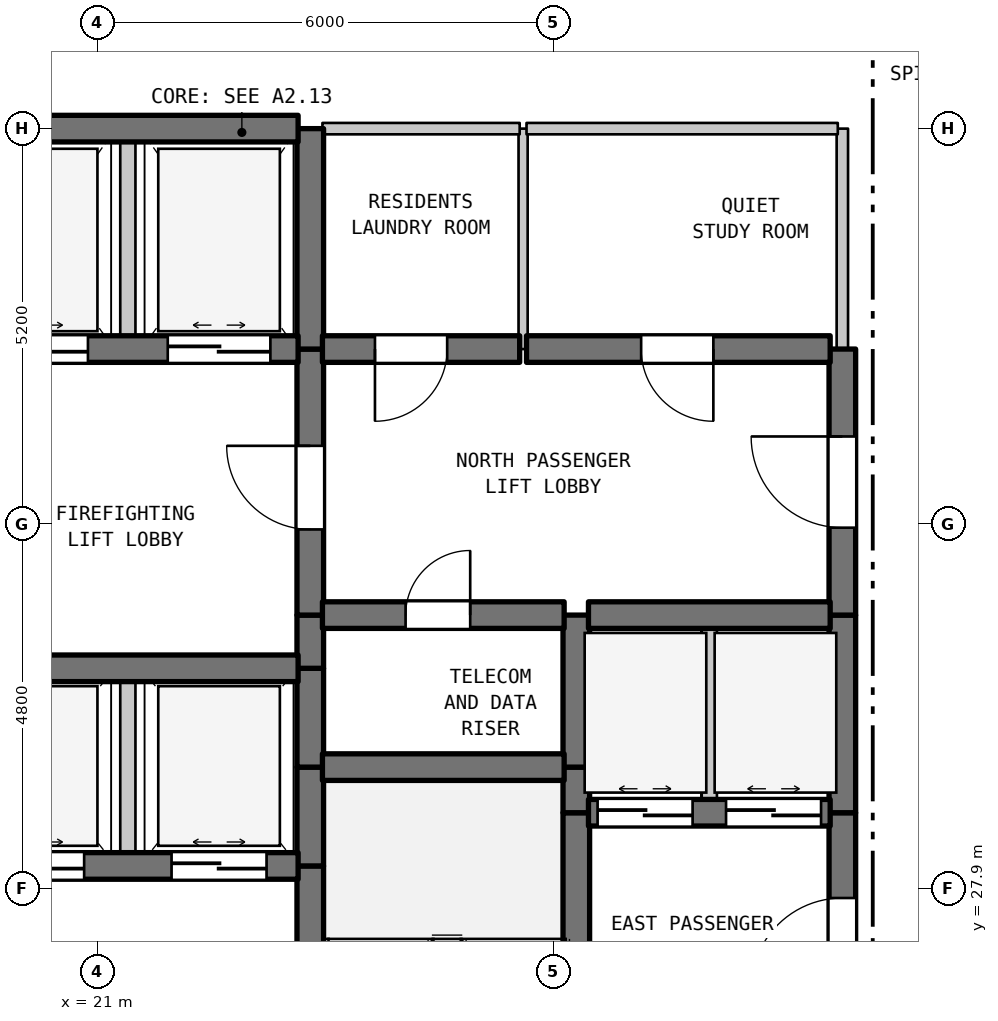
"""IFC4 building model, lengths in metres.
Left out: names, types, materials, properties, quantities, classifications, styles, units other than length and angle.
Written with IfcOpenShell. Run it as: python <this file> out.ifc"""

import sys

from ifc_helpers import new_model, si_unit, direction, frame, frame_2d, origin, place, context, subcontext, project, spatial, rectangle, extrude, element, fill, save


model = new_model("IFC4")
c1 = context("Model", 3, precision=1e-05, world=origin(), true_north=direction((0.0, 1.0)))
c2 = subcontext(c1, "Body", "Model", "MODEL_VIEW")
j1 = project(units=[si_unit("LENGTHUNIT", "METRE"), si_unit("PLANEANGLEUNIT", "RADIAN")], contexts=[c1])
p1 = place(None, origin())
s1 = spatial("IfcSite", under=j1, at=p1, CompositionType="ELEMENT")
p2 = place(p1, origin())
s2 = spatial("IfcBuilding", under=s1, at=p2, CompositionType="ELEMENT")
p3 = place(p2, frame((0.0, 0.0, 152.0)))
s3 = spatial("IfcBuildingStorey", under=s2, at=p3, CompositionType="ELEMENT", Elevation=152.0)
p4 = place(p3, frame((21.4, 28.2, 0.0), z_axis=(0.0, 0.0, 1.0), x_axis=(0.0, 1.0, 0.0)))
e1 = element("IfcWall", 1, at=p4, inside=s3, PredefinedType="STANDARD", context=c2, shape_type="SweptSolid", body=[
    extrude(rectangle(XDim=2.6, YDim=0.2, at=frame_2d((1.3, 0.0))), origin(), (0.0, 0.0, 1.0), 3.385),
])
p5 = place(p3, frame((21.4, 35.0, 0.0), z_axis=(0.0, 0.0, 1.0), x_axis=(0.0, 1.0, 0.0)))
e2 = element("IfcWall", 2, at=p5, inside=s3, PredefinedType="STANDARD", context=c2, shape_type="SweptSolid", body=[
    extrude(rectangle(XDim=2.9, YDim=0.2, at=frame_2d((1.45, 0.0))), origin(), (0.0, 0.0, 1.0), 3.385),
])
p6 = place(p3, frame((23.8, 22.7, 0.0), z_axis=(0.0, 0.0, 1.0), x_axis=(0.0, 1.0, 0.0)))
e3 = element("IfcWall", 3, at=p6, inside=s3, PredefinedType="SHEAR", context=c2, shape_type="SweptSolid", body=[
    extrude(rectangle(XDim=5.5, YDim=0.35, at=frame_2d((2.75, 0.0))), origin(), (0.0, 0.0, 1.0), 3.385),
])
p7 = place(p6, frame((0.235, 0.0, 0.0)))
e4 = element("IfcOpeningElement", 4, at=p7, cuts=e3, PredefinedType="OPENING", context=c2, shape_type="SweptSolid", body=[
    extrude(rectangle(XDim=1.1, YDim=2.15, at=frame_2d((0.55, 1.075))), frame((0.0, 0.185, 0.0), z_axis=(0.0, -1.0, 0.0), x_axis=(1.0, 0.0, 0.0)), (0.0, 0.0, 1.0), 0.37),
])
for number, where, z_axis, x_axis in (
    (5, (23.8, 28.2, 0.0), (0.0, 0.0, 1.0), (0.0, 1.0, 0.0)),
    (6, (23.8, 29.5, 0.0), (0.0, 0.0, 1.0), (0.0, 1.0, 0.0)),
):
    element("IfcWall", number, at=place(p3, frame(where, z_axis=z_axis, x_axis=x_axis)), inside=s3, PredefinedType="SHEAR", context=c2, shape_type="SweptSolid", body=[
        extrude(rectangle(XDim=1.3, YDim=0.35, at=frame_2d((0.65, 0.0))), origin(), (0.0, 0.0, 1.0), 3.385),
    ])
p8 = place(p3, frame((23.8, 30.8, 0.0), z_axis=(0.0, 0.0, 1.0), x_axis=(0.0, 1.0, 0.0)))
e7 = element("IfcWall", 7, at=p8, inside=s3, PredefinedType="SHEAR", context=c2, shape_type="SweptSolid", body=[
    extrude(rectangle(XDim=0.7, YDim=0.35, at=frame_2d((0.35, 0.0))), origin(), (0.0, 0.0, 1.0), 3.385),
])
p9 = place(p3, frame((23.8, 31.5, 0.0), z_axis=(0.0, 0.0, 1.0), x_axis=(0.0, 1.0, 0.0)))
e8 = element("IfcWall", 8, at=p9, inside=s3, PredefinedType="SHEAR", context=c2, shape_type="SweptSolid", body=[
    extrude(rectangle(XDim=3.5, YDim=0.35, at=frame_2d((1.75, 0.0))), origin(), (0.0, 0.0, 1.0), 3.385),
])
p10 = place(p9, frame((1.127, 0.0, 0.0)))
e9 = element("IfcOpeningElement", 9, at=p10, cuts=e8, PredefinedType="OPENING", context=c2, shape_type="SweptSolid", body=[
    extrude(rectangle(XDim=1.1, YDim=2.15, at=frame_2d((0.55, 1.075))), frame((0.0, 0.185, 0.0), z_axis=(0.0, -1.0, 0.0), x_axis=(1.0, 0.0, 0.0)), (0.0, 0.0, 1.0), 0.37),
])
p11 = place(p3, frame((23.8, 35.0, 0.0), z_axis=(0.0, 0.0, 1.0), x_axis=(0.0, 1.0, 0.0)))
e10 = element("IfcWall", 10, at=p11, inside=s3, PredefinedType="SHEAR", context=c2, shape_type="SweptSolid", body=[
    extrude(rectangle(XDim=2.9, YDim=0.35, at=frame_2d((1.45, 0.0))), origin(), (0.0, 0.0, 1.0), 3.385),
])
p12 = place(p3, frame((26.6, 35.0, 0.0), z_axis=(0.0, 0.0, 1.0), x_axis=(0.0, 1.0, 0.0)))
e11 = element("IfcWall", 11, at=p12, inside=s3, PredefinedType="PARTITIONING", context=c2, shape_type="SweptSolid", body=[
    extrude(rectangle(XDim=2.9, YDim=0.12, at=frame_2d((1.45, 0.0))), origin(), (0.0, 0.0, 1.0), 3.385),
])
p13 = place(p3, frame((27.3, 25.6, 0.0), z_axis=(0.0, 0.0, 1.0), x_axis=(0.0, 1.0, 0.0)))
e12 = element("IfcWall", 12, at=p13, inside=s3, PredefinedType="SHEAR", context=c2, shape_type="SweptSolid", body=[
    extrude(rectangle(XDim=3.3, YDim=0.35, at=frame_2d((1.65, 0.0))), origin(), (0.0, 0.0, 1.0), 3.385),
])
p14 = place(p3, frame((27.3, 28.9, 0.0), z_axis=(0.0, 0.0, 1.0), x_axis=(0.0, 1.0, 0.0)))
e13 = element("IfcWall", 13, at=p14, inside=s3, PredefinedType="SHEAR", context=c2, shape_type="SweptSolid", body=[
    extrude(rectangle(XDim=0.6, YDim=0.35, at=frame_2d((0.3, 0.0))), origin(), (0.0, 0.0, 1.0), 3.385),
])
p15 = place(p3, frame((27.3, 29.5, 0.0), z_axis=(0.0, 0.0, 1.0), x_axis=(0.0, 1.0, 0.0)))
e14 = element("IfcWall", 14, at=p15, inside=s3, PredefinedType="SHEAR", context=c2, shape_type="SweptSolid", body=[
    extrude(rectangle(XDim=2.0, YDim=0.35, at=frame_2d((1.0, 0.0))), origin(), (0.0, 0.0, 1.0), 3.385),
])
p16 = place(p3, frame((29.05, 28.9, 0.0), z_axis=(0.0, 0.0, 1.0), x_axis=(0.0, 1.0, 0.0)))
e15 = element("IfcWall", 15, at=p16, inside=s3, PredefinedType="STANDARD", context=c2, shape_type="SweptSolid", body=[
    extrude(rectangle(XDim=2.6, YDim=0.2, at=frame_2d((1.3, 0.0))), origin(), (0.0, 0.0, 1.0), 3.385),
])
p17 = place(p3, frame((30.8, 25.6, 0.0), z_axis=(0.0, 0.0, 1.0), x_axis=(0.0, 1.0, 0.0)))
e16 = element("IfcWall", 16, at=p17, inside=s3, PredefinedType="SHEAR", context=c2, shape_type="SweptSolid", body=[
    extrude(rectangle(XDim=3.3, YDim=0.35, at=frame_2d((1.65, 0.0))), origin(), (0.0, 0.0, 1.0), 3.385),
])
p18 = place(p17, frame((0.978, 0.0, 0.0)))
e17 = element("IfcOpeningElement", 17, at=p18, cuts=e16, PredefinedType="OPENING", context=c2, shape_type="SweptSolid", body=[
    extrude(rectangle(XDim=1.2, YDim=2.2, at=frame_2d((0.6, 1.1))), frame((0.0, 0.185, 0.0), z_axis=(0.0, -1.0, 0.0), x_axis=(1.0, 0.0, 0.0)), (0.0, 0.0, 1.0), 0.37),
])
p19 = place(p3, frame((30.8, 28.9, 0.0), z_axis=(0.0, 0.0, 1.0), x_axis=(0.0, 1.0, 0.0)))
e18 = element("IfcWall", 18, at=p19, inside=s3, PredefinedType="SHEAR", context=c2, shape_type="SweptSolid", body=[
    extrude(rectangle(XDim=2.6, YDim=0.35, at=frame_2d((1.3, 0.0))), origin(), (0.0, 0.0, 1.0), 3.385),
])
p20 = place(p3, frame((30.8, 31.5, 0.0), z_axis=(0.0, 0.0, 1.0), x_axis=(0.0, 1.0, 0.0)))
e19 = element("IfcWall", 19, at=p20, inside=s3, PredefinedType="SHEAR", context=c2, shape_type="SweptSolid", body=[
    extrude(rectangle(XDim=3.5, YDim=0.35, at=frame_2d((1.75, 0.0))), origin(), (0.0, 0.0, 1.0), 3.385),
])
p21 = place(p20, frame((1.15, 0.0, 0.0)))
e20 = element("IfcOpeningElement", 20, at=p21, cuts=e19, PredefinedType="OPENING", context=c2, shape_type="SweptSolid", body=[
    extrude(rectangle(XDim=1.2, YDim=2.2, at=frame_2d((0.6, 1.1))), frame((0.0, 0.185, 0.0), z_axis=(0.0, -1.0, 0.0), x_axis=(1.0, 0.0, 0.0)), (0.0, 0.0, 1.0), 0.37),
])
p22 = place(p3, frame((30.8, 35.0, 0.0), z_axis=(0.0, 0.0, 1.0), x_axis=(0.0, 1.0, 0.0)))
e21 = element("IfcWall", 21, at=p22, inside=s3, PredefinedType="STANDARD", context=c2, shape_type="SweptSolid", body=[
    extrude(rectangle(XDim=2.9, YDim=0.15, at=frame_2d((1.45, 0.0))), origin(), (0.0, 0.0, 1.0), 3.385),
])
p23 = place(p3, frame((19.16, 28.2, 0.0), z_axis=(0.0, 0.0, 1.0), x_axis=(1.0, 0.0, 0.0)))
e22 = element("IfcWall", 22, at=p23, inside=s3, PredefinedType="SHEAR", context=c2, shape_type="SweptSolid", body=[
    extrude(rectangle(XDim=4.48, YDim=0.35, at=frame_2d((2.24, 0.0))), origin(), (0.0, 0.0, 1.0), 3.385),
])
p24 = place(p23, frame((0.415, 0.0, 0.0)))
e23 = element("IfcOpeningElement", 23, at=p24, cuts=e22, PredefinedType="OPENING", context=c2, shape_type="SweptSolid", body=[
    extrude(rectangle(XDim=1.25, YDim=2.2, at=frame_2d((0.625, 1.1))), frame((0.0, 0.185, 0.0), z_axis=(0.0, -1.0, 0.0), x_axis=(1.0, 0.0, 0.0)), (0.0, 0.0, 1.0), 0.37),
])
p25 = place(p23, frame((2.815, 0.0, 0.0)))
e24 = element("IfcOpeningElement", 24, at=p25, cuts=e22, PredefinedType="OPENING", context=c2, shape_type="SweptSolid", body=[
    extrude(rectangle(XDim=1.25, YDim=2.2, at=frame_2d((0.625, 1.1))), frame((0.0, 0.185, 0.0), z_axis=(0.0, -1.0, 0.0), x_axis=(1.0, 0.0, 0.0)), (0.0, 0.0, 1.0), 0.37),
])
p26 = place(p3, frame((27.46, 28.9, 0.0), z_axis=(0.0, 0.0, 1.0), x_axis=(1.0, 0.0, 0.0)))
e25 = element("IfcWall", 25, at=p26, inside=s3, PredefinedType="SHEAR", context=c2, shape_type="SweptSolid", body=[
    extrude(rectangle(XDim=3.18, YDim=0.35, at=frame_2d((1.59, 0.0))), origin(), (0.0, 0.0, 1.0), 3.385),
])
p27 = place(p26, frame((0.12, 0.0, 0.0)))
e26 = element("IfcOpeningElement", 26, at=p27, cuts=e25, PredefinedType="OPENING", context=c2, shape_type="SweptSolid", body=[
    extrude(rectangle(XDim=1.25, YDim=2.2, at=frame_2d((0.625, 1.1))), frame((0.0, 0.185, 0.0), z_axis=(0.0, -1.0, 0.0), x_axis=(1.0, 0.0, 0.0)), (0.0, 0.0, 1.0), 0.37),
])
p28 = place(p26, frame((1.81, 0.0, 0.0)))
e27 = element("IfcOpeningElement", 27, at=p28, cuts=e25, PredefinedType="OPENING", context=c2, shape_type="SweptSolid", body=[
    extrude(rectangle(XDim=1.25, YDim=2.2, at=frame_2d((0.625, 1.1))), frame((0.0, 0.185, 0.0), z_axis=(0.0, -1.0, 0.0), x_axis=(1.0, 0.0, 0.0)), (0.0, 0.0, 1.0), 0.37),
])
p29 = place(p3, frame((23.96, 29.5, 0.0), z_axis=(0.0, 0.0, 1.0), x_axis=(1.0, 0.0, 0.0)))
e28 = element("IfcWall", 28, at=p29, inside=s3, PredefinedType="SHEAR", context=c2, shape_type="SweptSolid", body=[
    extrude(rectangle(XDim=3.18, YDim=0.35, at=frame_2d((1.59, 0.0))), origin(), (0.0, 0.0, 1.0), 3.385),
])
p30 = place(p3, frame((19.16, 30.8, 0.0), z_axis=(0.0, 0.0, 1.0), x_axis=(1.0, 0.0, 0.0)))
e29 = element("IfcWall", 29, at=p30, inside=s3, PredefinedType="SHEAR", context=c2, shape_type="SweptSolid", body=[
    extrude(rectangle(XDim=4.48, YDim=0.35, at=frame_2d((2.24, 0.0))), origin(), (0.0, 0.0, 1.0), 3.385),
])
p31 = place(p3, frame((23.96, 31.5, 0.0), z_axis=(0.0, 0.0, 1.0), x_axis=(1.0, 0.0, 0.0)))
e30 = element("IfcWall", 30, at=p31, inside=s3, PredefinedType="SHEAR", context=c2, shape_type="SweptSolid", body=[
    extrude(rectangle(XDim=3.18, YDim=0.35, at=frame_2d((1.59, 0.0))), origin(), (0.0, 0.0, 1.0), 3.385),
])
p32 = place(p31, frame((1.094, 0.0, 0.0)))
e31 = element("IfcOpeningElement", 31, at=p32, cuts=e30, PredefinedType="OPENING", context=c2, shape_type="SweptSolid", body=[
    extrude(rectangle(XDim=0.85, YDim=2.1, at=frame_2d((0.425, 1.05))), frame((0.0, 0.185, 0.0), z_axis=(0.0, -1.0, 0.0), x_axis=(1.0, 0.0, 0.0)), (0.0, 0.0, 1.0), 0.37),
])
p33 = place(p3, frame((27.46, 31.5, 0.0), z_axis=(0.0, 0.0, 1.0), x_axis=(1.0, 0.0, 0.0)))
e32 = element("IfcWall", 32, at=p33, inside=s3, PredefinedType="SHEAR", context=c2, shape_type="SweptSolid", body=[
    extrude(rectangle(XDim=3.18, YDim=0.35, at=frame_2d((1.59, 0.0))), origin(), (0.0, 0.0, 1.0), 3.385),
])
p34 = place(p3, frame((19.16, 35.0, 0.0), z_axis=(0.0, 0.0, 1.0), x_axis=(1.0, 0.0, 0.0)))
e33 = element("IfcWall", 33, at=p34, inside=s3, PredefinedType="SHEAR", context=c2, shape_type="SweptSolid", body=[
    extrude(rectangle(XDim=4.48, YDim=0.35, at=frame_2d((2.24, 0.0))), origin(), (0.0, 0.0, 1.0), 3.385),
])
p35 = place(p34, frame((0.365, 0.0, 0.0)))
e34 = element("IfcOpeningElement", 34, at=p35, cuts=e33, PredefinedType="OPENING", context=c2, shape_type="SweptSolid", body=[
    extrude(rectangle(XDim=1.35, YDim=2.2, at=frame_2d((0.675, 1.1))), frame((0.0, 0.185, 0.0), z_axis=(0.0, -1.0, 0.0), x_axis=(1.0, 0.0, 0.0)), (0.0, 0.0, 1.0), 0.37),
])
p36 = place(p34, frame((2.765, 0.0, 0.0)))
e35 = element("IfcOpeningElement", 35, at=p36, cuts=e33, PredefinedType="OPENING", context=c2, shape_type="SweptSolid", body=[
    extrude(rectangle(XDim=1.35, YDim=2.2, at=frame_2d((0.675, 1.1))), frame((0.0, 0.185, 0.0), z_axis=(0.0, -1.0, 0.0), x_axis=(1.0, 0.0, 0.0)), (0.0, 0.0, 1.0), 0.37),
])
p37 = place(p3, frame((23.96, 35.0, 0.0), z_axis=(0.0, 0.0, 1.0), x_axis=(1.0, 0.0, 0.0)))
e36 = element("IfcWall", 36, at=p37, inside=s3, PredefinedType="SHEAR", context=c2, shape_type="SweptSolid", body=[
    extrude(rectangle(XDim=2.595, YDim=0.35, at=frame_2d((1.297, 0.0))), origin(), (0.0, 0.0, 1.0), 3.385),
])
p38 = place(p37, frame((0.691, 0.0, 0.0)))
e37 = element("IfcOpeningElement", 37, at=p38, cuts=e36, PredefinedType="OPENING", context=c2, shape_type="SweptSolid", body=[
    extrude(rectangle(XDim=0.95, YDim=2.15, at=frame_2d((0.475, 1.075))), frame((0.0, 0.185, 0.0), z_axis=(0.0, -1.0, 0.0), x_axis=(1.0, 0.0, 0.0)), (0.0, 0.0, 1.0), 0.37),
])
p39 = place(p3, frame((26.645, 35.0, 0.0), z_axis=(0.0, 0.0, 1.0), x_axis=(1.0, 0.0, 0.0)))
e38 = element("IfcWall", 38, at=p39, inside=s3, PredefinedType="SHEAR", context=c2, shape_type="SweptSolid", body=[
    extrude(rectangle(XDim=3.995, YDim=0.35, at=frame_2d((1.998, 0.0))), origin(), (0.0, 0.0, 1.0), 3.385),
])
p40 = place(p39, frame((1.508, 0.0, 0.0)))
e39 = element("IfcOpeningElement", 39, at=p40, cuts=e38, PredefinedType="OPENING", context=c2, shape_type="SweptSolid", body=[
    extrude(rectangle(XDim=0.95, YDim=2.15, at=frame_2d((0.475, 1.075))), frame((0.0, 0.185, 0.0), z_axis=(0.0, -1.0, 0.0), x_axis=(1.0, 0.0, 0.0)), (0.0, 0.0, 1.0), 0.37),
])
p41 = place(p3, frame((19.16, 37.9, 0.0), z_axis=(0.0, 0.0, 1.0), x_axis=(1.0, 0.0, 0.0)))
e40 = element("IfcWall", 40, at=p41, inside=s3, PredefinedType="SHEAR", context=c2, shape_type="SweptSolid", body=[
    extrude(rectangle(XDim=4.48, YDim=0.35, at=frame_2d((2.24, 0.0))), origin(), (0.0, 0.0, 1.0), 3.385),
])
p42 = place(p3, frame((23.96, 37.9, 0.0), z_axis=(0.0, 0.0, 1.0), x_axis=(1.0, 0.0, 0.0)))
e41 = element("IfcWall", 41, at=p42, inside=s3, PredefinedType="STANDARD", context=c2, shape_type="SweptSolid", body=[
    extrude(rectangle(XDim=2.595, YDim=0.15, at=frame_2d((1.297, 0.0))), origin(), (0.0, 0.0, 1.0), 2.885),
])
p43 = place(p3, frame((26.645, 37.9, 0.0), z_axis=(0.0, 0.0, 1.0), x_axis=(1.0, 0.0, 0.0)))
e42 = element("IfcWall", 42, at=p43, inside=s3, PredefinedType="STANDARD", context=c2, shape_type="SweptSolid", body=[
    extrude(rectangle(XDim=4.095, YDim=0.15, at=frame_2d((2.047, 0.0))), origin(), (0.0, 0.0, 1.0), 2.885),
])
p44 = place(p10, origin())
e43 = element("IfcDoor", 43, at=p44, inside=s3, OperationType="SINGLE_SWING_RIGHT", PredefinedType="DOOR", context=c2, shape_type="SweptSolid", body=[
    extrude(rectangle(XDim=1.1, YDim=2.15, at=frame_2d((0.55, 1.075))), frame((0.0, 0.025, 0.0), z_axis=(0.0, -1.0, 0.0), x_axis=(1.0, 0.0, 0.0)), (0.0, 0.0, 1.0), 0.05),
])
fill(e9, e43)
p45 = place(p18, origin())
e44 = element("IfcDoor", 44, at=p45, inside=s3, OperationType="SINGLE_SWING_LEFT", PredefinedType="DOOR", context=c2, shape_type="SweptSolid", body=[
    extrude(rectangle(XDim=1.2, YDim=2.2, at=frame_2d((0.6, 1.1))), frame((0.0, 0.025, 0.0), z_axis=(0.0, -1.0, 0.0), x_axis=(1.0, 0.0, 0.0)), (0.0, 0.0, 1.0), 0.05),
])
fill(e17, e44)
p46 = place(p21, origin())
e45 = element("IfcDoor", 45, at=p46, inside=s3, OperationType="SINGLE_SWING_RIGHT", PredefinedType="DOOR", context=c2, shape_type="SweptSolid", body=[
    extrude(rectangle(XDim=1.2, YDim=2.2, at=frame_2d((0.6, 1.1))), frame((0.0, 0.025, 0.0), z_axis=(0.0, -1.0, 0.0), x_axis=(1.0, 0.0, 0.0)), (0.0, 0.0, 1.0), 0.05),
])
fill(e20, e45)
p47 = place(p24, origin())
e46 = element("IfcDoor", 46, at=p47, inside=s3, OperationType="DOUBLE_DOOR_SLIDING", PredefinedType="DOOR", context=c2, shape_type="SweptSolid", body=[
    extrude(rectangle(XDim=1.25, YDim=2.2, at=frame_2d((0.625, 1.1))), frame((0.0, 0.025, 0.0), z_axis=(0.0, -1.0, 0.0), x_axis=(1.0, 0.0, 0.0)), (0.0, 0.0, 1.0), 0.05),
])
fill(e23, e46)
p48 = place(p25, origin())
e47 = element("IfcDoor", 47, at=p48, inside=s3, OperationType="DOUBLE_DOOR_SLIDING", PredefinedType="DOOR", context=c2, shape_type="SweptSolid", body=[
    extrude(rectangle(XDim=1.25, YDim=2.2, at=frame_2d((0.625, 1.1))), frame((0.0, 0.025, 0.0), z_axis=(0.0, -1.0, 0.0), x_axis=(1.0, 0.0, 0.0)), (0.0, 0.0, 1.0), 0.05),
])
fill(e24, e47)
p49 = place(p27, origin())
e48 = element("IfcDoor", 48, at=p49, inside=s3, OperationType="DOUBLE_DOOR_SLIDING", PredefinedType="DOOR", context=c2, shape_type="SweptSolid", body=[
    extrude(rectangle(XDim=1.25, YDim=2.2, at=frame_2d((0.625, 1.1))), frame((0.0, 0.025, 0.0), z_axis=(0.0, -1.0, 0.0), x_axis=(1.0, 0.0, 0.0)), (0.0, 0.0, 1.0), 0.05),
])
fill(e26, e48)
p50 = place(p28, origin())
e49 = element("IfcDoor", 49, at=p50, inside=s3, OperationType="DOUBLE_DOOR_SLIDING", PredefinedType="DOOR", context=c2, shape_type="SweptSolid", body=[
    extrude(rectangle(XDim=1.25, YDim=2.2, at=frame_2d((0.625, 1.1))), frame((0.0, 0.025, 0.0), z_axis=(0.0, -1.0, 0.0), x_axis=(1.0, 0.0, 0.0)), (0.0, 0.0, 1.0), 0.05),
])
fill(e27, e49)
p51 = place(p32, origin())
e50 = element("IfcDoor", 50, at=p51, inside=s3, OperationType="SINGLE_SWING_RIGHT", PredefinedType="DOOR", context=c2, shape_type="SweptSolid", body=[
    extrude(rectangle(XDim=0.85, YDim=2.1, at=frame_2d((0.425, 1.05))), frame((0.0, 0.025, 0.0), z_axis=(0.0, -1.0, 0.0), x_axis=(1.0, 0.0, 0.0)), (0.0, 0.0, 1.0), 0.05),
])
fill(e31, e50)
p52 = place(p35, origin())
e51 = element("IfcDoor", 51, at=p52, inside=s3, OperationType="DOUBLE_DOOR_SLIDING", PredefinedType="DOOR", context=c2, shape_type="SweptSolid", body=[
    extrude(rectangle(XDim=1.35, YDim=2.2, at=frame_2d((0.675, 1.1))), frame((0.0, 0.025, 0.0), z_axis=(0.0, -1.0, 0.0), x_axis=(1.0, 0.0, 0.0)), (0.0, 0.0, 1.0), 0.05),
])
fill(e34, e51)
p53 = place(p36, origin())
e52 = element("IfcDoor", 52, at=p53, inside=s3, OperationType="DOUBLE_DOOR_SLIDING", PredefinedType="DOOR", context=c2, shape_type="SweptSolid", body=[
    extrude(rectangle(XDim=1.35, YDim=2.2, at=frame_2d((0.675, 1.1))), frame((0.0, 0.025, 0.0), z_axis=(0.0, -1.0, 0.0), x_axis=(1.0, 0.0, 0.0)), (0.0, 0.0, 1.0), 0.05),
])
fill(e35, e52)
p54 = place(p38, frame((0.95, 0.0, 0.0), z_axis=(0.0, 0.0, 1.0), x_axis=(-1.0, 0.0, 0.0)))
e53 = element("IfcDoor", 53, at=p54, inside=s3, OperationType="SINGLE_SWING_LEFT", PredefinedType="DOOR", context=c2, shape_type="SweptSolid", body=[
    extrude(rectangle(XDim=0.95, YDim=2.15, at=frame_2d((0.475, 1.075))), frame((0.0, 0.025, 0.0), z_axis=(0.0, -1.0, 0.0), x_axis=(1.0, 0.0, 0.0)), (0.0, 0.0, 1.0), 0.05),
])
fill(e37, e53)
p55 = place(p40, frame((0.95, 0.0, 0.0), z_axis=(0.0, 0.0, 1.0), x_axis=(-1.0, 0.0, 0.0)))
e54 = element("IfcDoor", 54, at=p55, inside=s3, OperationType="SINGLE_SWING_RIGHT", PredefinedType="DOOR", context=c2, shape_type="SweptSolid", body=[
    extrude(rectangle(XDim=0.95, YDim=2.15, at=frame_2d((0.475, 1.075))), frame((0.0, 0.025, 0.0), z_axis=(0.0, -1.0, 0.0), x_axis=(1.0, 0.0, 0.0)), (0.0, 0.0, 1.0), 0.05),
])
fill(e39, e54)
save(model, sys.argv[1])
